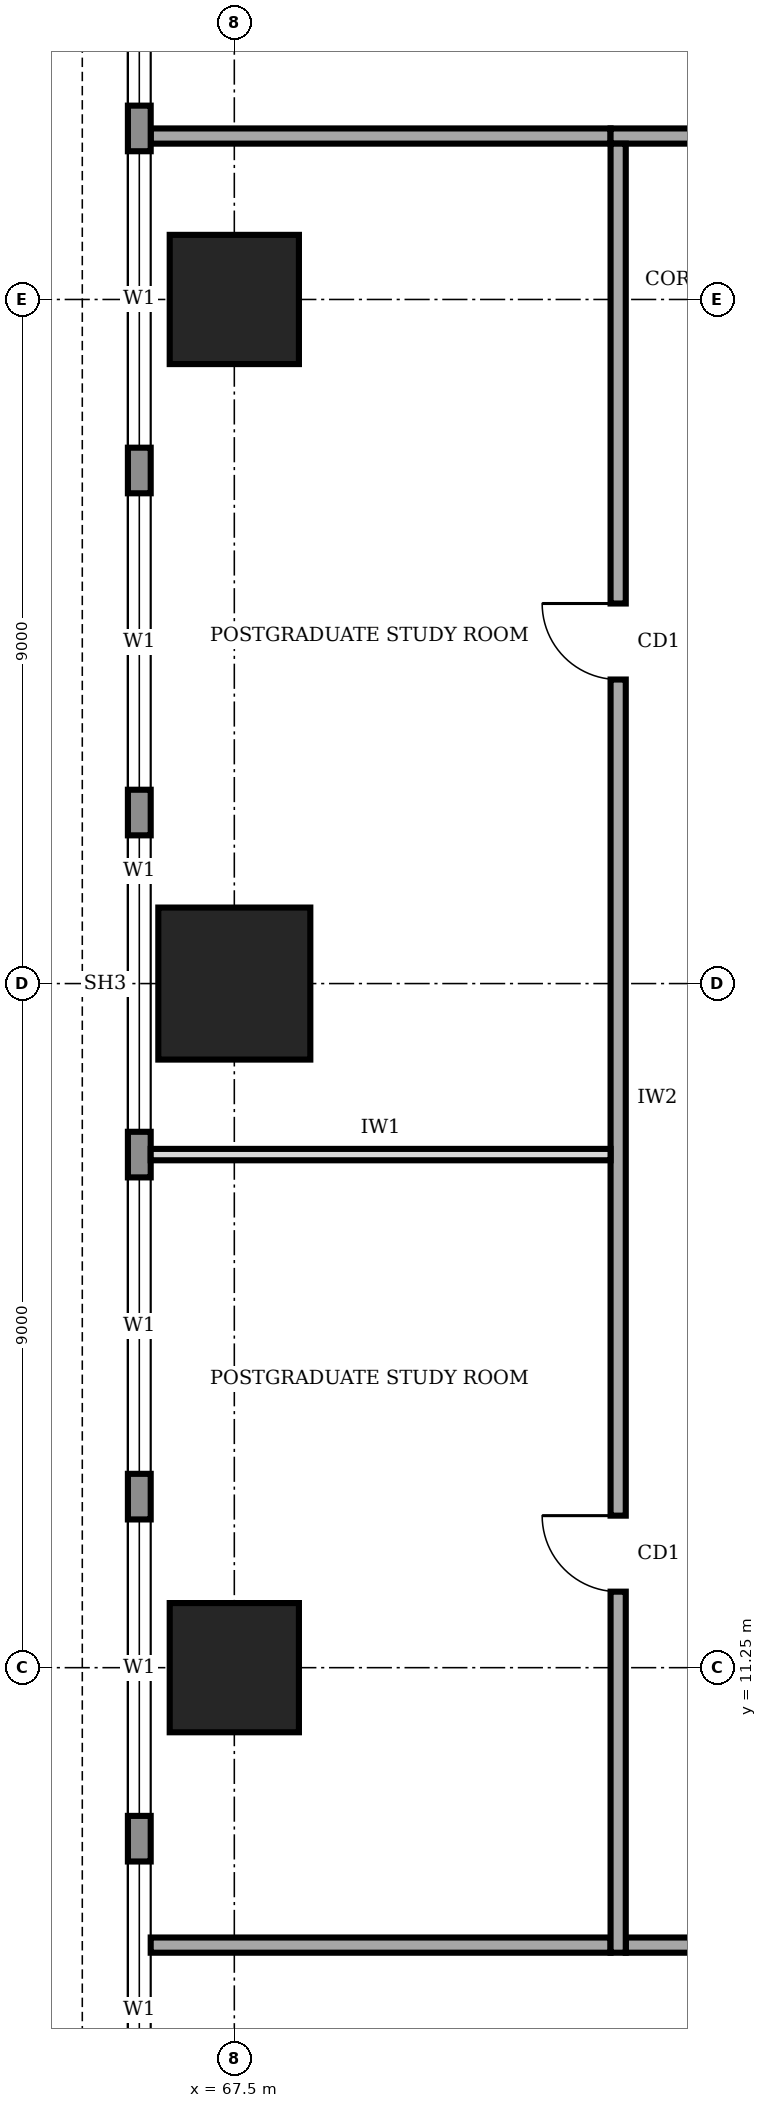
"""IFC4 building model, lengths in metres.
Left out: names, types, materials, properties, quantities, classifications, styles, units other than length and angle.
Written with IfcOpenShell. Run it as: python <this file> out.ifc"""

import sys

from ifc_helpers import new_model, si_unit, direction, frame, frame_2d, origin, origin_2d, place, context, subcontext, project, spatial, rectangle, extrude, element, fill, save


model = new_model("IFC4")
c1 = context("Model", 3, precision=1e-05, world=origin(), true_north=direction((0.0, 1.0)))
c2 = subcontext(c1, "Body", "Model", "MODEL_VIEW")
j1 = project(units=[si_unit("LENGTHUNIT", "METRE"), si_unit("PLANEANGLEUNIT", "RADIAN")], contexts=[c1])
p1 = place(None, origin())
s1 = spatial("IfcSite", under=j1, at=p1, CompositionType="ELEMENT")
p2 = place(p1, origin())
s2 = spatial("IfcBuilding", under=s1, at=p2, CompositionType="ELEMENT")
p3 = place(p2, frame((0.0, 0.0, 213.0)))
s3 = spatial("IfcBuildingStorey", under=s2, at=p3, CompositionType="ELEMENT", Elevation=213.0)
p4 = place(p3, frame((67.5, 11.25, 0.0), z_axis=(0.0, 0.0, 1.0), x_axis=(1.0, 0.0, 0.0)))
e1 = element("IfcColumn", 1, at=p4, inside=s3, PredefinedType="COLUMN", context=c2, shape_type="SweptSolid", body=[
    extrude(rectangle(XDim=1.7, YDim=1.7, at=origin_2d()), origin(), (0.0, 0.0, 1.0), 4.0),
])
p5 = place(p3, frame((67.5, 20.25, 0.0), z_axis=(0.0, 0.0, 1.0), x_axis=(1.0, 0.0, 0.0)))
e2 = element("IfcColumn", 2, at=p5, inside=s3, PredefinedType="COLUMN", context=c2, shape_type="SweptSolid", body=[
    extrude(rectangle(XDim=2.0, YDim=2.0, at=origin_2d()), origin(), (0.0, 0.0, 1.0), 4.0),
])
p6 = place(p3, frame((67.5, 29.25, 0.0), z_axis=(0.0, 0.0, 1.0), x_axis=(1.0, 0.0, 0.0)))
e3 = element("IfcColumn", 3, at=p6, inside=s3, PredefinedType="COLUMN", context=c2, shape_type="SweptSolid", body=[
    extrude(rectangle(XDim=1.7, YDim=1.7, at=origin_2d()), origin(), (0.0, 0.0, 1.0), 4.0),
])
p7 = place(p3, frame((66.25, 37.18, 0.0), z_axis=(0.0, 0.0, 1.0), x_axis=(0.0, -1.0, 0.0)))
e4 = element("IfcWall", 4, at=p7, inside=s3, PredefinedType="STANDARD", context=c2, shape_type="SweptSolid", body=[
    extrude(rectangle(XDim=33.86, YDim=0.3, at=frame_2d((16.93, 0.0))), origin(), (0.0, 0.0, 1.0), 3.75),
])
p8 = place(p7, frame((28.48, 0.0, 0.9)))
e5 = element("IfcOpeningElement", 5, at=p8, cuts=e4, PredefinedType="OPENING", context=c2, shape_type="SweptSolid", body=[
    extrude(rectangle(XDim=3.9, YDim=2.2, at=frame_2d((1.95, 1.1))), frame((0.0, 0.16, 0.0), z_axis=(0.0, -1.0, 0.0), x_axis=(1.0, 0.0, 0.0)), (0.0, 0.0, 1.0), 0.32),
])
p9 = place(p7, frame((23.98, 0.0, 0.9)))
e6 = element("IfcOpeningElement", 6, at=p9, cuts=e4, PredefinedType="OPENING", context=c2, shape_type="SweptSolid", body=[
    extrude(rectangle(XDim=3.9, YDim=2.2, at=frame_2d((1.95, 1.1))), frame((0.0, 0.16, 0.0), z_axis=(0.0, -1.0, 0.0), x_axis=(1.0, 0.0, 0.0)), (0.0, 0.0, 1.0), 0.32),
])
p10 = place(p7, frame((19.48, 0.0, 0.9)))
e7 = element("IfcOpeningElement", 7, at=p10, cuts=e4, PredefinedType="OPENING", context=c2, shape_type="SweptSolid", body=[
    extrude(rectangle(XDim=3.9, YDim=2.2, at=frame_2d((1.95, 1.1))), frame((0.0, 0.16, 0.0), z_axis=(0.0, -1.0, 0.0), x_axis=(1.0, 0.0, 0.0)), (0.0, 0.0, 1.0), 0.32),
])
p11 = place(p7, frame((14.98, 0.0, 0.9)))
e8 = element("IfcOpeningElement", 8, at=p11, cuts=e4, PredefinedType="OPENING", context=c2, shape_type="SweptSolid", body=[
    extrude(rectangle(XDim=3.9, YDim=2.2, at=frame_2d((1.95, 1.1))), frame((0.0, 0.16, 0.0), z_axis=(0.0, -1.0, 0.0), x_axis=(1.0, 0.0, 0.0)), (0.0, 0.0, 1.0), 0.32),
])
p12 = place(p7, frame((10.48, 0.0, 0.9)))
e9 = element("IfcOpeningElement", 9, at=p12, cuts=e4, PredefinedType="OPENING", context=c2, shape_type="SweptSolid", body=[
    extrude(rectangle(XDim=3.9, YDim=2.2, at=frame_2d((1.95, 1.1))), frame((0.0, 0.16, 0.0), z_axis=(0.0, -1.0, 0.0), x_axis=(1.0, 0.0, 0.0)), (0.0, 0.0, 1.0), 0.32),
])
p13 = place(p7, frame((5.98, 0.0, 0.9)))
e10 = element("IfcOpeningElement", 10, at=p13, cuts=e4, PredefinedType="OPENING", context=c2, shape_type="SweptSolid", body=[
    extrude(rectangle(XDim=3.9, YDim=2.2, at=frame_2d((1.95, 1.1))), frame((0.0, 0.16, 0.0), z_axis=(0.0, -1.0, 0.0), x_axis=(1.0, 0.0, 0.0)), (0.0, 0.0, 1.0), 0.32),
])
p14 = place(p7, frame((1.48, 0.0, 0.9)))
e11 = element("IfcOpeningElement", 11, at=p14, cuts=e4, PredefinedType="OPENING", context=c2, shape_type="SweptSolid", body=[
    extrude(rectangle(XDim=3.9, YDim=2.2, at=frame_2d((1.95, 1.1))), frame((0.0, 0.16, 0.0), z_axis=(0.0, -1.0, 0.0), x_axis=(1.0, 0.0, 0.0)), (0.0, 0.0, 1.0), 0.32),
])
p15 = place(p3, frame((72.65, 7.6, 0.0), z_axis=(0.0, 0.0, 1.0), x_axis=(1.0, 0.0, 0.0)))
e12 = element("IfcWall", 12, at=p15, inside=s3, PredefinedType="SOLIDWALL", context=c2, shape_type="SweptSolid", body=[
    extrude(rectangle(XDim=16.9, YDim=0.2, at=frame_2d((8.45, 0.0))), origin(), (0.0, 0.0, 1.0), 3.75),
])
p16 = place(p15, frame((7.45, 0.0, 0.0)))
e13 = element("IfcOpeningElement", 13, at=p16, cuts=e12, PredefinedType="OPENING", context=c2, shape_type="SweptSolid", body=[
    extrude(rectangle(XDim=1.8, YDim=2.1, at=frame_2d((0.9, 1.05))), frame((0.0, 0.11, 0.0), z_axis=(0.0, -1.0, 0.0), x_axis=(1.0, 0.0, 0.0)), (0.0, 0.0, 1.0), 0.22),
])
p17 = place(p3, frame((89.35, 31.4, 0.0), z_axis=(0.0, 0.0, 1.0), x_axis=(-1.0, 0.0, 0.0)))
e14 = element("IfcWall", 14, at=p17, inside=s3, PredefinedType="SOLIDWALL", context=c2, shape_type="SweptSolid", body=[
    extrude(rectangle(XDim=16.9, YDim=0.2, at=frame_2d((8.45, 0.0))), origin(), (0.0, 0.0, 1.0), 3.75),
])
p18 = place(p17, frame((14.375, 0.0, 0.0)))
e15 = element("IfcOpeningElement", 15, at=p18, cuts=e14, PredefinedType="OPENING", context=c2, shape_type="SweptSolid", body=[
    extrude(rectangle(XDim=1.0, YDim=2.1, at=frame_2d((0.5, 1.05))), frame((0.0, 0.11, 0.0), z_axis=(0.0, -1.0, 0.0), x_axis=(1.0, 0.0, 0.0)), (0.0, 0.0, 1.0), 0.22),
])
p19 = place(p17, frame((10.1, 0.0, 0.0)))
e16 = element("IfcOpeningElement", 16, at=p19, cuts=e14, PredefinedType="OPENING", context=c2, shape_type="SweptSolid", body=[
    extrude(rectangle(XDim=1.0, YDim=2.1, at=frame_2d((0.5, 1.05))), frame((0.0, 0.11, 0.0), z_axis=(0.0, -1.0, 0.0), x_axis=(1.0, 0.0, 0.0)), (0.0, 0.0, 1.0), 0.22),
])
p20 = place(p3, frame((72.55, 31.3, 0.0), z_axis=(0.0, 0.0, 1.0), x_axis=(0.0, -1.0, 0.0)))
e17 = element("IfcWall", 17, at=p20, inside=s3, PredefinedType="SOLIDWALL", context=c2, shape_type="SweptSolid", body=[
    extrude(rectangle(XDim=23.8, YDim=0.2, at=frame_2d((11.9, 0.0))), origin(), (0.0, 0.0, 1.0), 3.75),
])
p21 = place(p20, frame((18.05, 0.0, 0.0)))
e18 = element("IfcOpeningElement", 18, at=p21, cuts=e17, PredefinedType="OPENING", context=c2, shape_type="SweptSolid", body=[
    extrude(rectangle(XDim=1.0, YDim=2.1, at=frame_2d((0.5, 1.05))), frame((0.0, 0.11, 0.0), z_axis=(0.0, -1.0, 0.0), x_axis=(1.0, 0.0, 0.0)), (0.0, 0.0, 1.0), 0.22),
])
p22 = place(p20, frame((6.05, 0.0, 0.0)))
e19 = element("IfcOpeningElement", 19, at=p22, cuts=e17, PredefinedType="OPENING", context=c2, shape_type="SweptSolid", body=[
    extrude(rectangle(XDim=1.0, YDim=2.1, at=frame_2d((0.5, 1.05))), frame((0.0, 0.11, 0.0), z_axis=(0.0, -1.0, 0.0), x_axis=(1.0, 0.0, 0.0)), (0.0, 0.0, 1.0), 0.22),
])
for number, where, z_axis, x_axis in (
    (20, (66.4, 7.6, 0.0), (0.0, 0.0, 1.0), (1.0, 0.0, 0.0)),
    (21, (66.4, 31.4, 0.0), (0.0, 0.0, 1.0), (1.0, 0.0, 0.0)),
):
    element("IfcWall", number, at=place(p3, frame(where, z_axis=z_axis, x_axis=x_axis)), inside=s3, PredefinedType="SOLIDWALL", context=c2, shape_type="SweptSolid", body=[
        extrude(rectangle(XDim=6.05, YDim=0.2, at=frame_2d((3.025, 0.0))), origin(), (0.0, 0.0, 1.0), 3.75),
    ])
p23 = place(p3, frame((66.4, 18.0, 0.0), z_axis=(0.0, 0.0, 1.0), x_axis=(1.0, 0.0, 0.0)))
e22 = element("IfcWall", 22, at=p23, inside=s3, PredefinedType="PARTITIONING", context=c2, shape_type="SweptSolid", body=[
    extrude(rectangle(XDim=6.05, YDim=0.15, at=frame_2d((3.025, 0.0))), origin(), (0.0, 0.0, 1.0), 3.75),
])
p24 = place(p8, origin())
e23 = element("IfcWindow", 23, at=p24, inside=s3, PartitioningType="SINGLE_PANEL", PredefinedType="WINDOW", context=c2, shape_type="SweptSolid", body=[
    extrude(rectangle(XDim=3.9, YDim=2.2, at=frame_2d((1.95, 1.1))), frame((0.0, 0.03, 0.0), z_axis=(0.0, -1.0, 0.0), x_axis=(1.0, 0.0, 0.0)), (0.0, 0.0, 1.0), 0.06),
])
fill(e5, e23)
p25 = place(p9, origin())
e24 = element("IfcWindow", 24, at=p25, inside=s3, PartitioningType="SINGLE_PANEL", PredefinedType="WINDOW", context=c2, shape_type="SweptSolid", body=[
    extrude(rectangle(XDim=3.9, YDim=2.2, at=frame_2d((1.95, 1.1))), frame((0.0, 0.03, 0.0), z_axis=(0.0, -1.0, 0.0), x_axis=(1.0, 0.0, 0.0)), (0.0, 0.0, 1.0), 0.06),
])
fill(e6, e24)
p26 = place(p10, origin())
e25 = element("IfcWindow", 25, at=p26, inside=s3, PartitioningType="SINGLE_PANEL", PredefinedType="WINDOW", context=c2, shape_type="SweptSolid", body=[
    extrude(rectangle(XDim=3.9, YDim=2.2, at=frame_2d((1.95, 1.1))), frame((0.0, 0.03, 0.0), z_axis=(0.0, -1.0, 0.0), x_axis=(1.0, 0.0, 0.0)), (0.0, 0.0, 1.0), 0.06),
])
fill(e7, e25)
p27 = place(p11, origin())
e26 = element("IfcWindow", 26, at=p27, inside=s3, PartitioningType="SINGLE_PANEL", PredefinedType="WINDOW", context=c2, shape_type="SweptSolid", body=[
    extrude(rectangle(XDim=3.9, YDim=2.2, at=frame_2d((1.95, 1.1))), frame((0.0, 0.03, 0.0), z_axis=(0.0, -1.0, 0.0), x_axis=(1.0, 0.0, 0.0)), (0.0, 0.0, 1.0), 0.06),
])
fill(e8, e26)
p28 = place(p12, origin())
e27 = element("IfcWindow", 27, at=p28, inside=s3, PartitioningType="SINGLE_PANEL", PredefinedType="WINDOW", context=c2, shape_type="SweptSolid", body=[
    extrude(rectangle(XDim=3.9, YDim=2.2, at=frame_2d((1.95, 1.1))), frame((0.0, 0.03, 0.0), z_axis=(0.0, -1.0, 0.0), x_axis=(1.0, 0.0, 0.0)), (0.0, 0.0, 1.0), 0.06),
])
fill(e9, e27)
p29 = place(p13, origin())
e28 = element("IfcWindow", 28, at=p29, inside=s3, PartitioningType="SINGLE_PANEL", PredefinedType="WINDOW", context=c2, shape_type="SweptSolid", body=[
    extrude(rectangle(XDim=3.9, YDim=2.2, at=frame_2d((1.95, 1.1))), frame((0.0, 0.03, 0.0), z_axis=(0.0, -1.0, 0.0), x_axis=(1.0, 0.0, 0.0)), (0.0, 0.0, 1.0), 0.06),
])
fill(e10, e28)
p30 = place(p14, origin())
e29 = element("IfcWindow", 29, at=p30, inside=s3, PartitioningType="SINGLE_PANEL", PredefinedType="WINDOW", context=c2, shape_type="SweptSolid", body=[
    extrude(rectangle(XDim=3.9, YDim=2.2, at=frame_2d((1.95, 1.1))), frame((0.0, 0.03, 0.0), z_axis=(0.0, -1.0, 0.0), x_axis=(1.0, 0.0, 0.0)), (0.0, 0.0, 1.0), 0.06),
])
fill(e11, e29)
p31 = place(p21, frame((1.0, 0.0, 0.0), z_axis=(0.0, 0.0, 1.0), x_axis=(-1.0, 0.0, 0.0)))
e30 = element("IfcDoor", 30, at=p31, inside=s3, OperationType="SINGLE_SWING_RIGHT", PredefinedType="DOOR", context=c2, shape_type="SweptSolid", body=[
    extrude(rectangle(XDim=1.0, YDim=2.1, at=frame_2d((0.5, 1.05))), frame((0.0, 0.025, 0.0), z_axis=(0.0, -1.0, 0.0), x_axis=(1.0, 0.0, 0.0)), (0.0, 0.0, 1.0), 0.05),
])
fill(e18, e30)
p32 = place(p22, frame((1.0, 0.0, 0.0), z_axis=(0.0, 0.0, 1.0), x_axis=(-1.0, 0.0, 0.0)))
e31 = element("IfcDoor", 31, at=p32, inside=s3, OperationType="SINGLE_SWING_RIGHT", PredefinedType="DOOR", context=c2, shape_type="SweptSolid", body=[
    extrude(rectangle(XDim=1.0, YDim=2.1, at=frame_2d((0.5, 1.05))), frame((0.0, 0.025, 0.0), z_axis=(0.0, -1.0, 0.0), x_axis=(1.0, 0.0, 0.0)), (0.0, 0.0, 1.0), 0.05),
])
fill(e19, e31)
save(model, sys.argv[1])
